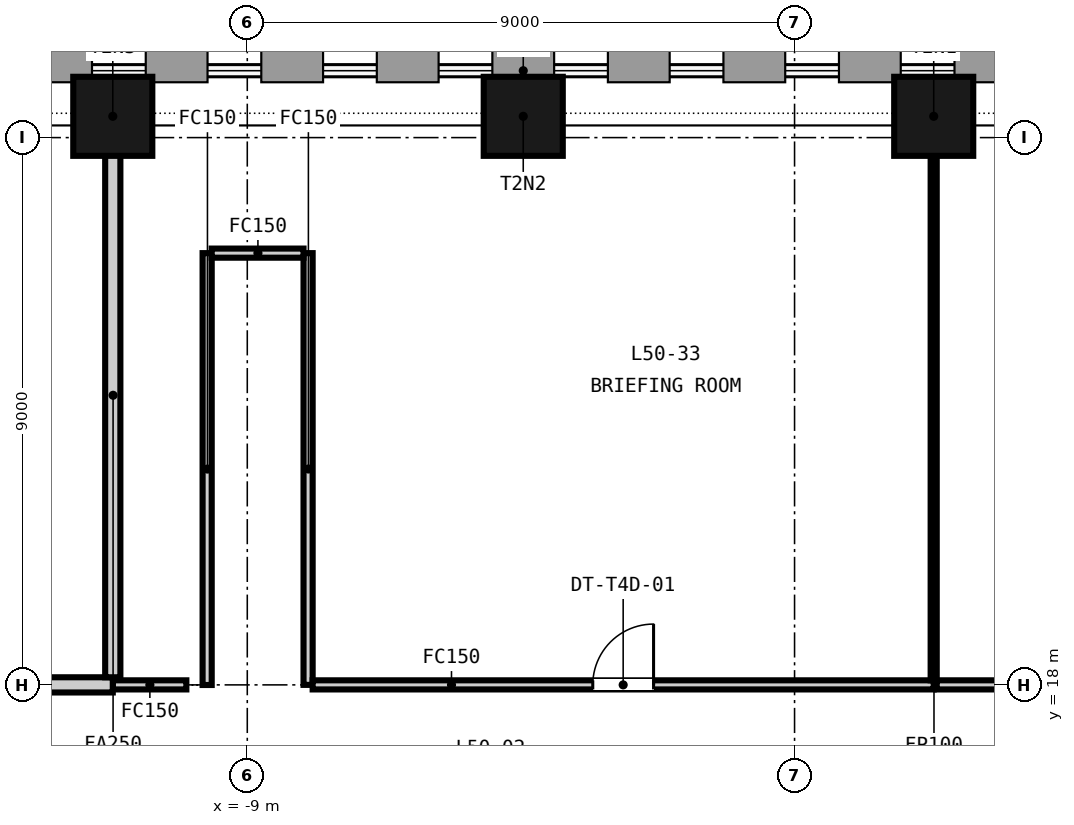
"""IFC4 building model, lengths in metres.
Left out: names, types, materials, properties, quantities, classifications, styles, units other than length and angle.
Written with IfcOpenShell. Run it as: python <this file> out.ifc"""

import sys

from ifc_helpers import new_model, si_unit, direction, frame, frame_2d, origin, origin_2d, place, context, subcontext, project, spatial, rectangle, extrude, element, fill, save


model = new_model("IFC4")
c1 = context("Model", 3, precision=1e-05, world=origin(), true_north=direction((0.0, 1.0)))
c2 = subcontext(c1, "Body", "Model", "MODEL_VIEW")
j1 = project(units=[si_unit("LENGTHUNIT", "METRE"), si_unit("PLANEANGLEUNIT", "RADIAN")], contexts=[c1])
p1 = place(None, origin())
s1 = spatial("IfcSite", under=j1, at=p1, CompositionType="ELEMENT")
p2 = place(p1, origin())
s2 = spatial("IfcBuilding", under=s1, at=p2, CompositionType="ELEMENT")
p3 = place(p2, frame((0.0, 0.0, 200.0)))
s3 = spatial("IfcBuildingStorey", under=s2, at=p3, CompositionType="ELEMENT", Elevation=200.0)
for number, where, z_axis, x_axis in (
    (1, (2.288, 27.35, -0.15), (0.0, 0.0, 1.0), (-1.0, 0.0, 0.0)),
    (2, (-4.462, 27.35, -0.15), (0.0, 0.0, 1.0), (-1.0, 0.0, 0.0)),
    (3, (-11.212, 27.35, -0.15), (0.0, 0.0, 1.0), (-1.0, 0.0, 0.0)),
):
    element("IfcColumn", number, at=place(p3, frame(where, z_axis=z_axis, x_axis=x_axis)), inside=s3, PredefinedType="COLUMN", context=c2, shape_type="SweptSolid", body=[
        extrude(rectangle(XDim=1.3, YDim=1.3, at=origin_2d()), origin(), (0.0, 0.0, 1.0), 3.65),
    ])
p4 = place(p3, frame((-8.0, 25.1, 0.0), z_axis=(0.0, 0.0, 1.0), x_axis=(0.0, -1.0, 0.0)))
e4 = element("IfcWall", 4, at=p4, inside=s3, PredefinedType="PARTITIONING", context=c2, shape_type="SweptSolid", body=[
    extrude(rectangle(XDim=7.1, YDim=0.15, at=frame_2d((3.55, 0.0))), origin(), (0.0, 0.0, 1.0), 2.741),
])
p5 = place(p3, frame((-11.212, 18.0, 0.0), z_axis=(0.0, 0.0, 1.0), x_axis=(1.0, 0.0, 0.0)))
e5 = element("IfcWall", 5, at=p5, inside=s3, PredefinedType="PARTITIONING", context=c2, shape_type="SweptSolid", body=[
    extrude(rectangle(XDim=1.21, YDim=0.15, at=frame_2d((0.605, 0.0))), origin(), (0.0, 0.0, 1.0), 2.741),
])
p6 = place(p3, frame((-9.66, 17.998, 0.0), z_axis=(0.0, 0.0, 1.0), x_axis=(0.0, 1.0, 0.0)))
e6 = element("IfcWall", 6, at=p6, inside=s3, PredefinedType="PARTITIONING", context=c2, shape_type="SweptSolid", body=[
    extrude(rectangle(XDim=7.102, YDim=0.15, at=frame_2d((3.551, 0.0))), origin(), (0.0, 0.0, 1.0), 2.741),
])
p7 = place(p3, frame((-9.585, 25.1, 0.0), z_axis=(0.0, 0.0, 1.0), x_axis=(1.0, 0.0, 0.0)))
e7 = element("IfcWall", 7, at=p7, inside=s3, PredefinedType="PARTITIONING", context=c2, shape_type="SweptSolid", body=[
    extrude(rectangle(XDim=1.51, YDim=0.15, at=frame_2d((0.755, 0.0))), origin(), (0.0, 0.0, 1.0), 2.741),
])
p8 = place(p3, frame((-7.925, 18.0, 0.0), z_axis=(0.0, 0.0, 1.0), x_axis=(1.0, 0.0, 0.0)))
e8 = element("IfcWall", 8, at=p8, inside=s3, PredefinedType="PARTITIONING", context=c2, shape_type="SweptSolid", body=[
    extrude(rectangle(XDim=10.213, YDim=0.15, at=frame_2d((5.106, 0.0))), origin(), (0.0, 0.0, 1.0), 2.741),
])
p9 = place(p8, frame((4.606, 0.0, 0.0)))
e9 = element("IfcOpeningElement", 9, at=p9, cuts=e8, PredefinedType="OPENING", context=c2, shape_type="SweptSolid", body=[
    extrude(rectangle(XDim=1.0, YDim=2.1, at=frame_2d((0.5, 1.05))), frame((0.0, 0.085, 0.0), z_axis=(0.0, -1.0, 0.0), x_axis=(1.0, 0.0, 0.0)), (0.0, 0.0, 1.0), 0.17),
])
p10 = place(p3, frame((2.288, 18.075, 0.0), z_axis=(0.0, 0.0, 1.0), x_axis=(0.0, 1.0, 0.0)))
e10 = element("IfcWall", 10, at=p10, inside=s3, PredefinedType="PARTITIONING", context=c2, shape_type="SweptSolid", body=[
    extrude(rectangle(XDim=9.325, YDim=0.1, at=frame_2d((4.663, 0.0))), origin(), (0.0, 0.0, 1.0), 2.741),
])
p11 = place(p3, frame((-16.32, 18.0, 0.0), z_axis=(0.0, 0.0, 1.0), x_axis=(1.0, 0.0, 0.0)))
e11 = element("IfcWall", 11, at=p11, inside=s3, PredefinedType="PARTITIONING", context=c2, shape_type="SweptSolid", body=[
    extrude(rectangle(XDim=5.108, YDim=0.25, at=frame_2d((2.554, 0.0))), origin(), (0.0, 0.0, 1.0), 2.741),
])
p12 = place(p3, frame((-11.212, 18.125, 0.0), z_axis=(0.0, 0.0, 1.0), x_axis=(0.0, 1.0, 0.0)))
e12 = element("IfcWall", 12, at=p12, inside=s3, PredefinedType="PARTITIONING", context=c2, shape_type="SweptSolid", body=[
    extrude(rectangle(XDim=9.275, YDim=0.25, at=frame_2d((4.637, 0.0))), origin(), (0.0, 0.0, 1.0), 2.741),
])
p13 = place(p3, frame((2.338, 18.0, 0.0), z_axis=(0.0, 0.0, 1.0), x_axis=(1.0, 0.0, 0.0)))
e13 = element("IfcWall", 13, at=p13, inside=s3, PredefinedType="PARTITIONING", context=c2, shape_type="SweptSolid", body=[
    extrude(rectangle(XDim=14.107, YDim=0.15, at=frame_2d((7.054, 0.0))), origin(), (0.0, 0.0, 1.0), 2.741),
])
p14 = place(p13, frame((6.154, 0.0, 0.0)))
e14 = element("IfcOpeningElement", 14, at=p14, cuts=e13, PredefinedType="OPENING", context=c2, shape_type="SweptSolid", body=[
    extrude(rectangle(XDim=1.8, YDim=2.1, at=frame_2d((0.9, 1.05))), frame((0.0, 0.085, 0.0), z_axis=(0.0, -1.0, 0.0), x_axis=(1.0, 0.0, 0.0)), (0.0, 0.0, 1.0), 0.17),
])
p15 = place(p9, origin())
e15 = element("IfcDoor", 15, at=p15, inside=s3, OperationType="SINGLE_SWING_RIGHT", PredefinedType="DOOR", context=c2, shape_type="SweptSolid", body=[
    extrude(rectangle(XDim=1.0, YDim=2.1, at=frame_2d((0.5, 1.05))), frame((0.0, 0.025, 0.0), z_axis=(0.0, -1.0, 0.0), x_axis=(1.0, 0.0, 0.0)), (0.0, 0.0, 1.0), 0.05),
])
fill(e9, e15)
save(model, sys.argv[1])
